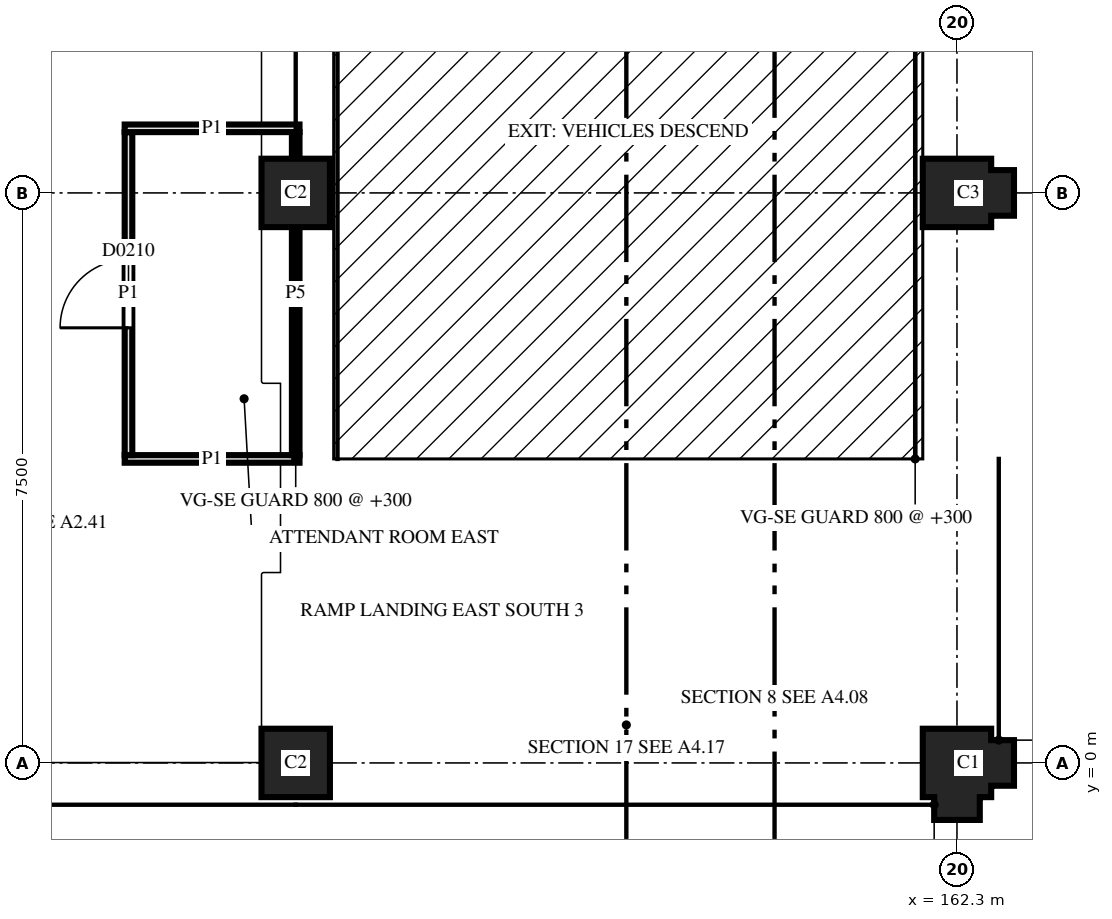
"""IFC4 building model, lengths in metres.
Left out: names, types, materials, properties, quantities, classifications, styles, units other than length and angle.
Written with IfcOpenShell. Run it as: python <this file> out.ifc"""

import sys

from ifc_helpers import new_model, si_unit, direction, frame, frame_2d, origin, place, context, subcontext, project, spatial, polyline, rectangle, outline, extrude, element, fill, save


model = new_model("IFC4")
c1 = context("Model", 3, precision=1e-05, world=origin(), true_north=direction((0.0, 1.0)))
c2 = subcontext(c1, "Body", "Model", "MODEL_VIEW")
j1 = project(units=[si_unit("LENGTHUNIT", "METRE"), si_unit("PLANEANGLEUNIT", "RADIAN")], contexts=[c1])
p1 = place(None, origin())
s1 = spatial("IfcSite", under=j1, at=p1, CompositionType="ELEMENT")
p2 = place(p1, origin())
s2 = spatial("IfcBuilding", under=s1, at=p2, CompositionType="ELEMENT")
p3 = place(p2, frame((0.0, 0.0, 8.2)))
s3 = spatial("IfcBuildingStorey", under=s2, at=p3, CompositionType="ELEMENT", Elevation=8.2)
p4 = place(p3, frame((153.6, 0.0, 0.0), z_axis=(0.0, 0.0, 1.0), x_axis=(1.0, 0.0, 0.0)))
e1 = element("IfcColumn", 1, at=p4, inside=s3, PredefinedType="COLUMN", context=c2, shape_type="SweptSolid", body=[
    extrude(outline(polyline([(-0.45, -0.45), (0.45, -0.45), (0.45, 0.45), (-0.45, 0.45), (-0.45, -0.45)])), origin(), (0.0, 0.0, 1.0), 3.7),
])
p5 = place(p3, frame((162.3, 0.0, 0.0), z_axis=(0.0, 0.0, 1.0), x_axis=(0.0, -1.0, 0.0)))
e2 = element("IfcColumn", 2, at=p5, inside=s3, PredefinedType="COLUMN", context=c2, shape_type="SweptSolid", body=[
    extrude(outline(polyline([(-0.45, -0.45), (0.45, -0.45), (0.45, -0.3), (0.75, -0.3), (0.75, 0.3), (0.45, 0.3), (0.45, 0.45), (0.3, 0.45), (0.3, 0.75), (-0.3, 0.75), (-0.3, 0.45), (-0.45, 0.45), (-0.45, -0.45)])), origin(), (0.0, 0.0, 1.0), 3.7),
])
p6 = place(p3, frame((153.6, 7.5, 0.0), z_axis=(0.0, 0.0, 1.0), x_axis=(1.0, 0.0, 0.0)))
e3 = element("IfcColumn", 3, at=p6, inside=s3, PredefinedType="COLUMN", context=c2, shape_type="SweptSolid", body=[
    extrude(outline(polyline([(-0.45, -0.45), (0.45, -0.45), (0.45, 0.45), (-0.45, 0.45), (-0.45, -0.45)])), origin(), (0.0, 0.0, 1.0), 3.7),
])
p7 = place(p3, frame((162.3, 7.5, 0.0), z_axis=(0.0, 0.0, 1.0), x_axis=(1.0, 0.0, 0.0)))
e4 = element("IfcColumn", 4, at=p7, inside=s3, PredefinedType="COLUMN", context=c2, shape_type="SweptSolid", body=[
    extrude(outline(polyline([(-0.45, -0.45), (0.45, -0.45), (0.45, -0.3), (0.75, -0.3), (0.75, 0.3), (0.45, 0.3), (0.45, 0.45), (-0.45, 0.45), (-0.45, -0.45)])), origin(), (0.0, 0.0, 1.0), 3.7),
])
p8 = place(p3, frame((151.35, 4.0, 0.0), z_axis=(0.0, 0.0, 1.0), x_axis=(1.0, 0.0, 0.0)))
e5 = element("IfcWall", 5, at=p8, inside=s3, PredefinedType="PARTITIONING", context=c2, shape_type="SweptSolid", body=[
    extrude(rectangle(XDim=2.3, YDim=0.1, at=frame_2d((1.15, 0.0))), origin(), (0.0, 0.0, 1.0), 2.88),
])
p9 = place(p3, frame((153.6, 4.05, 0.0), z_axis=(0.0, 0.0, 1.0), x_axis=(0.0, 1.0, 0.0)))
e6 = element("IfcWall", 6, at=p9, inside=s3, PredefinedType="PARTITIONING", context=c2, shape_type="SweptSolid", body=[
    extrude(rectangle(XDim=4.25, YDim=0.1, at=frame_2d((2.125, 0.0))), origin(), (0.0, 0.0, 1.0), 2.6),
])
p10 = place(p3, frame((151.4, 8.3, 0.0), z_axis=(0.0, 0.0, 1.0), x_axis=(0.0, -1.0, 0.0)))
e7 = element("IfcWall", 7, at=p10, inside=s3, PredefinedType="PARTITIONING", context=c2, shape_type="SweptSolid", body=[
    extrude(rectangle(XDim=4.25, YDim=0.1, at=frame_2d((2.125, 0.0))), origin(), (0.0, 0.0, 1.0), 2.88),
])
p11 = place(p10, frame((1.675, 0.0, 0.0)))
e8 = element("IfcOpeningElement", 8, at=p11, cuts=e7, PredefinedType="OPENING", context=c2, shape_type="SweptSolid", body=[
    extrude(rectangle(XDim=0.9, YDim=2.1, at=frame_2d((0.45, 1.05))), frame((0.0, 0.06, 0.0), z_axis=(0.0, -1.0, 0.0), x_axis=(1.0, 0.0, 0.0)), (0.0, 0.0, 1.0), 0.12),
])
p12 = place(p3, frame((153.65, 8.35, 0.0), z_axis=(0.0, 0.0, 1.0), x_axis=(-1.0, 0.0, 0.0)))
e9 = element("IfcWall", 9, at=p12, inside=s3, PredefinedType="PARTITIONING", context=c2, shape_type="SweptSolid", body=[
    extrude(rectangle(XDim=2.3, YDim=0.1, at=frame_2d((1.15, 0.0))), origin(), (0.0, 0.0, 1.0), 2.88),
])
p13 = place(p11, origin())
e10 = element("IfcDoor", 10, at=p13, inside=s3, OperationType="SINGLE_SWING_RIGHT", PredefinedType="DOOR", context=c2, shape_type="SweptSolid", body=[
    extrude(rectangle(XDim=0.9, YDim=2.1, at=frame_2d((0.45, 1.05))), frame((0.0, 0.025, 0.0), z_axis=(0.0, -1.0, 0.0), x_axis=(1.0, 0.0, 0.0)), (0.0, 0.0, 1.0), 0.05),
])
fill(e8, e10)
save(model, sys.argv[1])
